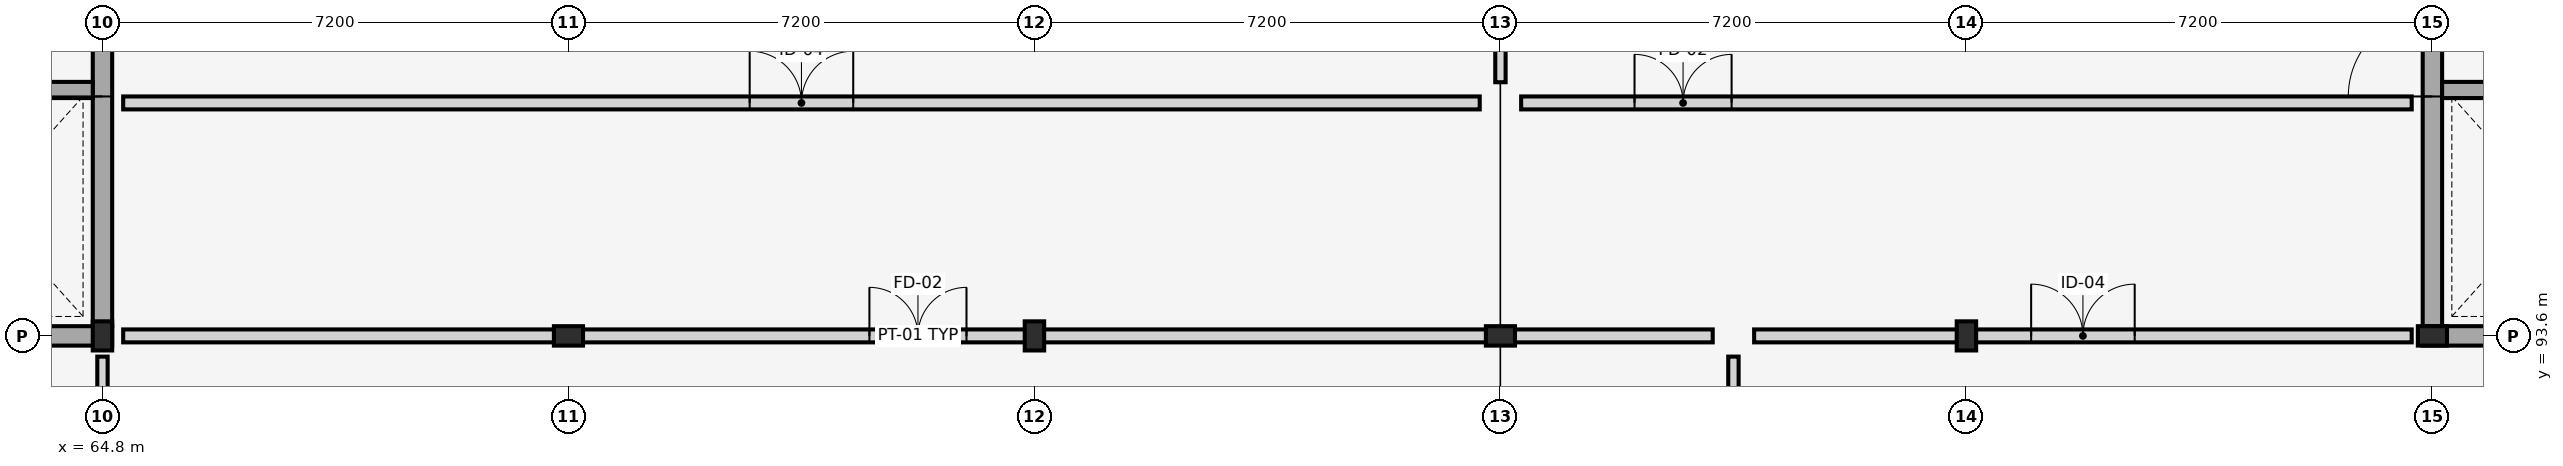
"""IFC4 building model, lengths in metres.
Left out: names, types, materials, properties, quantities, classifications, styles, units other than length and angle.
Written with IfcOpenShell. Run it as: python <this file> out.ifc"""

import sys

from ifc_helpers import new_model, si_unit, direction, frame, frame_2d, origin, origin_2d, place, context, subcontext, project, spatial, rectangle, i_section, extrude, element, fill, save


model = new_model("IFC4")
c1 = context("Model", 3, precision=1e-05, world=origin(), true_north=direction((0.0, 1.0)))
c2 = subcontext(c1, "Body", "Model", "MODEL_VIEW")
j1 = project(units=[si_unit("LENGTHUNIT", "METRE"), si_unit("PLANEANGLEUNIT", "RADIAN")], contexts=[c1])
p1 = place(None, origin())
s1 = spatial("IfcSite", under=j1, at=p1, CompositionType="ELEMENT")
p2 = place(p1, origin())
s2 = spatial("IfcBuilding", under=s1, at=p2, CompositionType="ELEMENT")
p3 = place(p2, frame((0.0, 0.0, 4.5)))
s3 = spatial("IfcBuildingStorey", under=s2, at=p3, CompositionType="ELEMENT", Elevation=4.5)
for number, where, z_axis, x_axis in (
    (1, (64.8, 93.6, 0.0), (0.0, 0.0, 1.0), (1.0, 0.0, 0.0)),
    (2, (72.0, 93.6, 0.0), (0.0, 0.0, 1.0), (0.0, 1.0, 0.0)),
    (3, (79.2, 93.6, 0.0), (0.0, 0.0, 1.0), (1.0, 0.0, 0.0)),
    (4, (86.4, 93.6, 0.0), (0.0, 0.0, 1.0), (0.0, 1.0, 0.0)),
    (5, (93.6, 93.6, 0.0), (0.0, 0.0, 1.0), (1.0, 0.0, 0.0)),
    (6, (100.8, 93.6, 0.0), (0.0, 0.0, 1.0), (0.0, 1.0, 0.0)),
):
    element("IfcColumn", number, at=place(p3, frame(where, z_axis=z_axis, x_axis=x_axis)), inside=s3, PredefinedType="COLUMN", context=c2, shape_type="SweptSolid", body=[
        extrude(i_section(OverallWidth=0.3, OverallDepth=0.45, WebThickness=0.014, FlangeThickness=0.026, FilletRadius=0.027, at=origin_2d()), origin(), (0.0, 0.0, 1.0), 4.2),
    ])
p4 = place(p3, frame((57.6, 93.6, 0.0), z_axis=(0.0, 0.0, 1.0), x_axis=(1.0, 0.0, 0.0)))
e7 = element("IfcWall", 7, at=p4, inside=s3, PredefinedType="SHEAR", context=c2, shape_type="SweptSolid", body=[
    extrude(rectangle(XDim=7.35, YDim=0.3, at=frame_2d((3.675, 0.0))), origin(), (0.0, 0.0, 1.0), 3.98),
])
p5 = place(p3, frame((64.8, 93.75, 0.0), z_axis=(0.0, 0.0, 1.0), x_axis=(0.0, 1.0, 0.0)))
e8 = element("IfcWall", 8, at=p5, inside=s3, PredefinedType="SHEAR", context=c2, shape_type="SweptSolid", body=[
    extrude(rectangle(XDim=14.1, YDim=0.3, at=frame_2d((7.05, 0.0))), origin(), (0.0, 0.0, 1.0), 3.98),
])
p6 = place(p5, frame((3.55, 0.0, 0.0)))
e9 = element("IfcOpeningElement", 9, at=p6, cuts=e8, PredefinedType="OPENING", context=c2, shape_type="SweptSolid", body=[
    extrude(rectangle(XDim=1.3, YDim=2.2, at=frame_2d((0.65, 1.1))), frame((0.0, 0.16, 0.0), z_axis=(0.0, -1.0, 0.0), x_axis=(1.0, 0.0, 0.0)), (0.0, 0.0, 1.0), 0.32),
])
p7 = place(p5, frame((7.85, 0.0, 0.0)))
e10 = element("IfcOpeningElement", 10, at=p7, cuts=e8, PredefinedType="OPENING", context=c2, shape_type="SweptSolid", body=[
    extrude(rectangle(XDim=1.05, YDim=2.15, at=frame_2d((0.525, 1.075))), frame((0.0, 0.16, 0.0), z_axis=(0.0, -1.0, 0.0), x_axis=(1.0, 0.0, 0.0)), (0.0, 0.0, 1.0), 0.32),
])
p8 = place(p5, frame((10.55, 0.0, 0.0)))
e11 = element("IfcOpeningElement", 11, at=p8, cuts=e8, PredefinedType="OPENING", context=c2, shape_type="SweptSolid", body=[
    extrude(rectangle(XDim=1.0, YDim=2.15, at=frame_2d((0.5, 1.075))), frame((0.0, 0.16, 0.0), z_axis=(0.0, -1.0, 0.0), x_axis=(1.0, 0.0, 0.0)), (0.0, 0.0, 1.0), 0.32),
])
p9 = place(p3, frame((61.275, 97.4, 0.0), z_axis=(0.0, 0.0, 1.0), x_axis=(1.0, 0.0, 0.0)))
e12 = element("IfcWall", 12, at=p9, inside=s3, PredefinedType="SHEAR", context=c2, shape_type="SweptSolid", body=[
    extrude(rectangle(XDim=3.375, YDim=0.25, at=frame_2d((1.688, 0.0))), origin(), (0.0, 0.0, 1.0), 3.98),
])
p10 = place(p3, frame((100.65, 93.6, 0.0), z_axis=(0.0, 0.0, 1.0), x_axis=(1.0, 0.0, 0.0)))
e13 = element("IfcWall", 13, at=p10, inside=s3, PredefinedType="SHEAR", context=c2, shape_type="SweptSolid", body=[
    extrude(rectangle(XDim=7.35, YDim=0.3, at=frame_2d((3.675, 0.0))), origin(), (0.0, 0.0, 1.0), 3.98),
])
p11 = place(p3, frame((100.8, 93.75, 0.0), z_axis=(0.0, 0.0, 1.0), x_axis=(0.0, 1.0, 0.0)))
e14 = element("IfcWall", 14, at=p11, inside=s3, PredefinedType="SHEAR", context=c2, shape_type="SweptSolid", body=[
    extrude(rectangle(XDim=14.1, YDim=0.3, at=frame_2d((7.05, 0.0))), origin(), (0.0, 0.0, 1.0), 3.98),
])
p12 = place(p11, frame((3.55, 0.0, 0.0)))
e15 = element("IfcOpeningElement", 15, at=p12, cuts=e14, PredefinedType="OPENING", context=c2, shape_type="SweptSolid", body=[
    extrude(rectangle(XDim=1.3, YDim=2.2, at=frame_2d((0.65, 1.1))), frame((0.0, 0.16, 0.0), z_axis=(0.0, -1.0, 0.0), x_axis=(1.0, 0.0, 0.0)), (0.0, 0.0, 1.0), 0.32),
])
p13 = place(p11, frame((7.85, 0.0, 0.0)))
e16 = element("IfcOpeningElement", 16, at=p13, cuts=e14, PredefinedType="OPENING", context=c2, shape_type="SweptSolid", body=[
    extrude(rectangle(XDim=1.05, YDim=2.15, at=frame_2d((0.525, 1.075))), frame((0.0, 0.16, 0.0), z_axis=(0.0, -1.0, 0.0), x_axis=(1.0, 0.0, 0.0)), (0.0, 0.0, 1.0), 0.32),
])
p14 = place(p11, frame((10.55, 0.0, 0.0)))
e17 = element("IfcOpeningElement", 17, at=p14, cuts=e14, PredefinedType="OPENING", context=c2, shape_type="SweptSolid", body=[
    extrude(rectangle(XDim=1.0, YDim=2.15, at=frame_2d((0.5, 1.075))), frame((0.0, 0.16, 0.0), z_axis=(0.0, -1.0, 0.0), x_axis=(1.0, 0.0, 0.0)), (0.0, 0.0, 1.0), 0.32),
])
p15 = place(p3, frame((100.95, 97.4, 0.0), z_axis=(0.0, 0.0, 1.0), x_axis=(1.0, 0.0, 0.0)))
e18 = element("IfcWall", 18, at=p15, inside=s3, PredefinedType="SHEAR", context=c2, shape_type="SweptSolid", body=[
    extrude(rectangle(XDim=3.375, YDim=0.25, at=frame_2d((1.688, 0.0))), origin(), (0.0, 0.0, 1.0), 3.98),
])
p16 = place(p3, frame((65.12, 93.6, 0.0), z_axis=(0.0, 0.0, 1.0), x_axis=(1.0, 0.0, 0.0)))
e19 = element("IfcWall", 19, at=p16, inside=s3, PredefinedType="PARTITIONING", context=c2, shape_type="SweptSolid", body=[
    extrude(rectangle(XDim=24.56, YDim=0.2, at=frame_2d((12.28, 0.0))), origin(), (0.0, 0.0, 1.0), 3.15),
])
p17 = place(p16, frame((11.53, 0.0, 0.0)))
e20 = element("IfcOpeningElement", 20, at=p17, cuts=e19, PredefinedType="OPENING", context=c2, shape_type="SweptSolid", body=[
    extrude(rectangle(XDim=1.5, YDim=2.25, at=frame_2d((0.75, 1.125))), frame((0.0, 0.11, 0.0), z_axis=(0.0, -1.0, 0.0), x_axis=(1.0, 0.0, 0.0)), (0.0, 0.0, 1.0), 0.22),
])
p18 = place(p3, frame((90.32, 93.6, 0.0), z_axis=(0.0, 0.0, 1.0), x_axis=(1.0, 0.0, 0.0)))
e21 = element("IfcWall", 21, at=p18, inside=s3, PredefinedType="PARTITIONING", context=c2, shape_type="SweptSolid", body=[
    extrude(rectangle(XDim=10.16, YDim=0.2, at=frame_2d((5.08, 0.0))), origin(), (0.0, 0.0, 1.0), 3.15),
])
p19 = place(p18, frame((4.28, 0.0, 0.0)))
e22 = element("IfcOpeningElement", 22, at=p19, cuts=e21, PredefinedType="OPENING", context=c2, shape_type="SweptSolid", body=[
    extrude(rectangle(XDim=1.6, YDim=2.35, at=frame_2d((0.8, 1.175))), frame((0.0, 0.11, 0.0), z_axis=(0.0, -1.0, 0.0), x_axis=(1.0, 0.0, 0.0)), (0.0, 0.0, 1.0), 0.22),
])
p20 = place(p3, frame((65.12, 97.2, 0.0), z_axis=(0.0, 0.0, 1.0), x_axis=(1.0, 0.0, 0.0)))
e23 = element("IfcWall", 23, at=p20, inside=s3, PredefinedType="PARTITIONING", context=c2, shape_type="SweptSolid", body=[
    extrude(rectangle(XDim=20.96, YDim=0.2, at=frame_2d((10.48, 0.0))), origin(), (0.0, 0.0, 1.0), 3.15),
])
p21 = place(p20, frame((9.68, 0.0, 0.0)))
e24 = element("IfcOpeningElement", 24, at=p21, cuts=e23, PredefinedType="OPENING", context=c2, shape_type="SweptSolid", body=[
    extrude(rectangle(XDim=1.6, YDim=2.35, at=frame_2d((0.8, 1.175))), frame((0.0, 0.11, 0.0), z_axis=(0.0, -1.0, 0.0), x_axis=(1.0, 0.0, 0.0)), (0.0, 0.0, 1.0), 0.22),
])
p22 = place(p3, frame((86.72, 97.2, 0.0), z_axis=(0.0, 0.0, 1.0), x_axis=(1.0, 0.0, 0.0)))
e25 = element("IfcWall", 25, at=p22, inside=s3, PredefinedType="PARTITIONING", context=c2, shape_type="SweptSolid", body=[
    extrude(rectangle(XDim=13.76, YDim=0.2, at=frame_2d((6.88, 0.0))), origin(), (0.0, 0.0, 1.0), 3.15),
])
p23 = place(p22, frame((1.752, 0.0, 0.0)))
e26 = element("IfcOpeningElement", 26, at=p23, cuts=e25, PredefinedType="OPENING", context=c2, shape_type="SweptSolid", body=[
    extrude(rectangle(XDim=1.5, YDim=2.25, at=frame_2d((0.75, 1.125))), frame((0.0, 0.11, 0.0), z_axis=(0.0, -1.0, 0.0), x_axis=(1.0, 0.0, 0.0)), (0.0, 0.0, 1.0), 0.22),
])
p24 = place(p3, frame((90.0, 86.72, 0.0), z_axis=(0.0, 0.0, 1.0), x_axis=(0.0, 1.0, 0.0)))
e27 = element("IfcWall", 27, at=p24, inside=s3, PredefinedType="PARTITIONING", context=c2, shape_type="SweptSolid", body=[
    extrude(rectangle(XDim=6.56, YDim=0.16, at=frame_2d((3.28, 0.0))), origin(), (0.0, 0.0, 1.0), 3.15),
])
p25 = place(p24, frame((2.355, 0.0, 0.0)))
e28 = element("IfcOpeningElement", 28, at=p25, cuts=e27, PredefinedType="OPENING", context=c2, shape_type="SweptSolid", body=[
    extrude(rectangle(XDim=1.85, YDim=2.5, at=frame_2d((0.925, 1.25))), frame((0.0, 0.09, 0.0), z_axis=(0.0, -1.0, 0.0), x_axis=(1.0, 0.0, 0.0)), (0.0, 0.0, 1.0), 0.18),
])
p26 = place(p3, frame((64.8, 86.72, 0.0), z_axis=(0.0, 0.0, 1.0), x_axis=(0.0, 1.0, 0.0)))
e29 = element("IfcWall", 29, at=p26, inside=s3, PredefinedType="PARTITIONING", context=c2, shape_type="SweptSolid", body=[
    extrude(rectangle(XDim=6.56, YDim=0.16, at=frame_2d((3.28, 0.0))), origin(), (0.0, 0.0, 1.0), 3.15),
])
p27 = place(p26, frame((2.255, 0.0, 0.0)))
e30 = element("IfcOpeningElement", 30, at=p27, cuts=e29, PredefinedType="OPENING", context=c2, shape_type="SweptSolid", body=[
    extrude(rectangle(XDim=2.05, YDim=2.55, at=frame_2d((1.025, 1.275))), frame((0.0, 0.09, 0.0), z_axis=(0.0, -1.0, 0.0), x_axis=(1.0, 0.0, 0.0)), (0.0, 0.0, 1.0), 0.18),
])
p28 = place(p3, frame((86.4, 97.52, 0.0), z_axis=(0.0, 0.0, 1.0), x_axis=(0.0, 1.0, 0.0)))
e31 = element("IfcWall", 31, at=p28, inside=s3, PredefinedType="PARTITIONING", context=c2, shape_type="SweptSolid", body=[
    extrude(rectangle(XDim=17.36, YDim=0.16, at=frame_2d((8.68, 0.0))), origin(), (0.0, 0.0, 1.0), 3.15),
])
p29 = place(p28, frame((8.23, 0.0, 0.0)))
e32 = element("IfcOpeningElement", 32, at=p29, cuts=e31, PredefinedType="OPENING", context=c2, shape_type="SweptSolid", body=[
    extrude(rectangle(XDim=0.9, YDim=2.1, at=frame_2d((0.45, 1.05))), frame((0.0, 0.09, 0.0), z_axis=(0.0, -1.0, 0.0), x_axis=(1.0, 0.0, 0.0)), (0.0, 0.0, 1.0), 0.18),
])
p30 = place(p6, origin())
e33 = element("IfcDoor", 33, at=p30, inside=s3, OperationType="SINGLE_SWING_LEFT", PredefinedType="DOOR", context=c2, shape_type="SweptSolid", body=[
    extrude(rectangle(XDim=1.3, YDim=2.2, at=frame_2d((0.65, 1.1))), frame((0.0, 0.025, 0.0), z_axis=(0.0, -1.0, 0.0), x_axis=(1.0, 0.0, 0.0)), (0.0, 0.0, 1.0), 0.05),
])
fill(e9, e33)
p31 = place(p12, origin())
e34 = element("IfcDoor", 34, at=p31, inside=s3, OperationType="SINGLE_SWING_LEFT", PredefinedType="DOOR", context=c2, shape_type="SweptSolid", body=[
    extrude(rectangle(XDim=1.3, YDim=2.2, at=frame_2d((0.65, 1.1))), frame((0.0, 0.025, 0.0), z_axis=(0.0, -1.0, 0.0), x_axis=(1.0, 0.0, 0.0)), (0.0, 0.0, 1.0), 0.05),
])
fill(e15, e34)
p32 = place(p17, origin())
e35 = element("IfcDoor", 35, at=p32, inside=s3, OperationType="DOUBLE_DOOR_SINGLE_SWING", PredefinedType="DOOR", context=c2, shape_type="SweptSolid", body=[
    extrude(rectangle(XDim=1.5, YDim=2.25, at=frame_2d((0.75, 1.125))), frame((0.0, 0.025, 0.0), z_axis=(0.0, -1.0, 0.0), x_axis=(1.0, 0.0, 0.0)), (0.0, 0.0, 1.0), 0.05),
])
fill(e20, e35)
p33 = place(p19, origin())
e36 = element("IfcDoor", 36, at=p33, inside=s3, OperationType="DOUBLE_DOOR_SINGLE_SWING", PredefinedType="DOOR", context=c2, shape_type="SweptSolid", body=[
    extrude(rectangle(XDim=1.6, YDim=2.35, at=frame_2d((0.8, 1.175))), frame((0.0, 0.025, 0.0), z_axis=(0.0, -1.0, 0.0), x_axis=(1.0, 0.0, 0.0)), (0.0, 0.0, 1.0), 0.05),
])
fill(e22, e36)
p34 = place(p21, origin())
e37 = element("IfcDoor", 37, at=p34, inside=s3, OperationType="DOUBLE_DOOR_SINGLE_SWING", PredefinedType="DOOR", context=c2, shape_type="SweptSolid", body=[
    extrude(rectangle(XDim=1.6, YDim=2.35, at=frame_2d((0.8, 1.175))), frame((0.0, 0.025, 0.0), z_axis=(0.0, -1.0, 0.0), x_axis=(1.0, 0.0, 0.0)), (0.0, 0.0, 1.0), 0.05),
])
fill(e24, e37)
p35 = place(p23, origin())
e38 = element("IfcDoor", 38, at=p35, inside=s3, OperationType="DOUBLE_DOOR_SINGLE_SWING", PredefinedType="DOOR", context=c2, shape_type="SweptSolid", body=[
    extrude(rectangle(XDim=1.5, YDim=2.25, at=frame_2d((0.75, 1.125))), frame((0.0, 0.025, 0.0), z_axis=(0.0, -1.0, 0.0), x_axis=(1.0, 0.0, 0.0)), (0.0, 0.0, 1.0), 0.05),
])
fill(e26, e38)
save(model, sys.argv[1])
